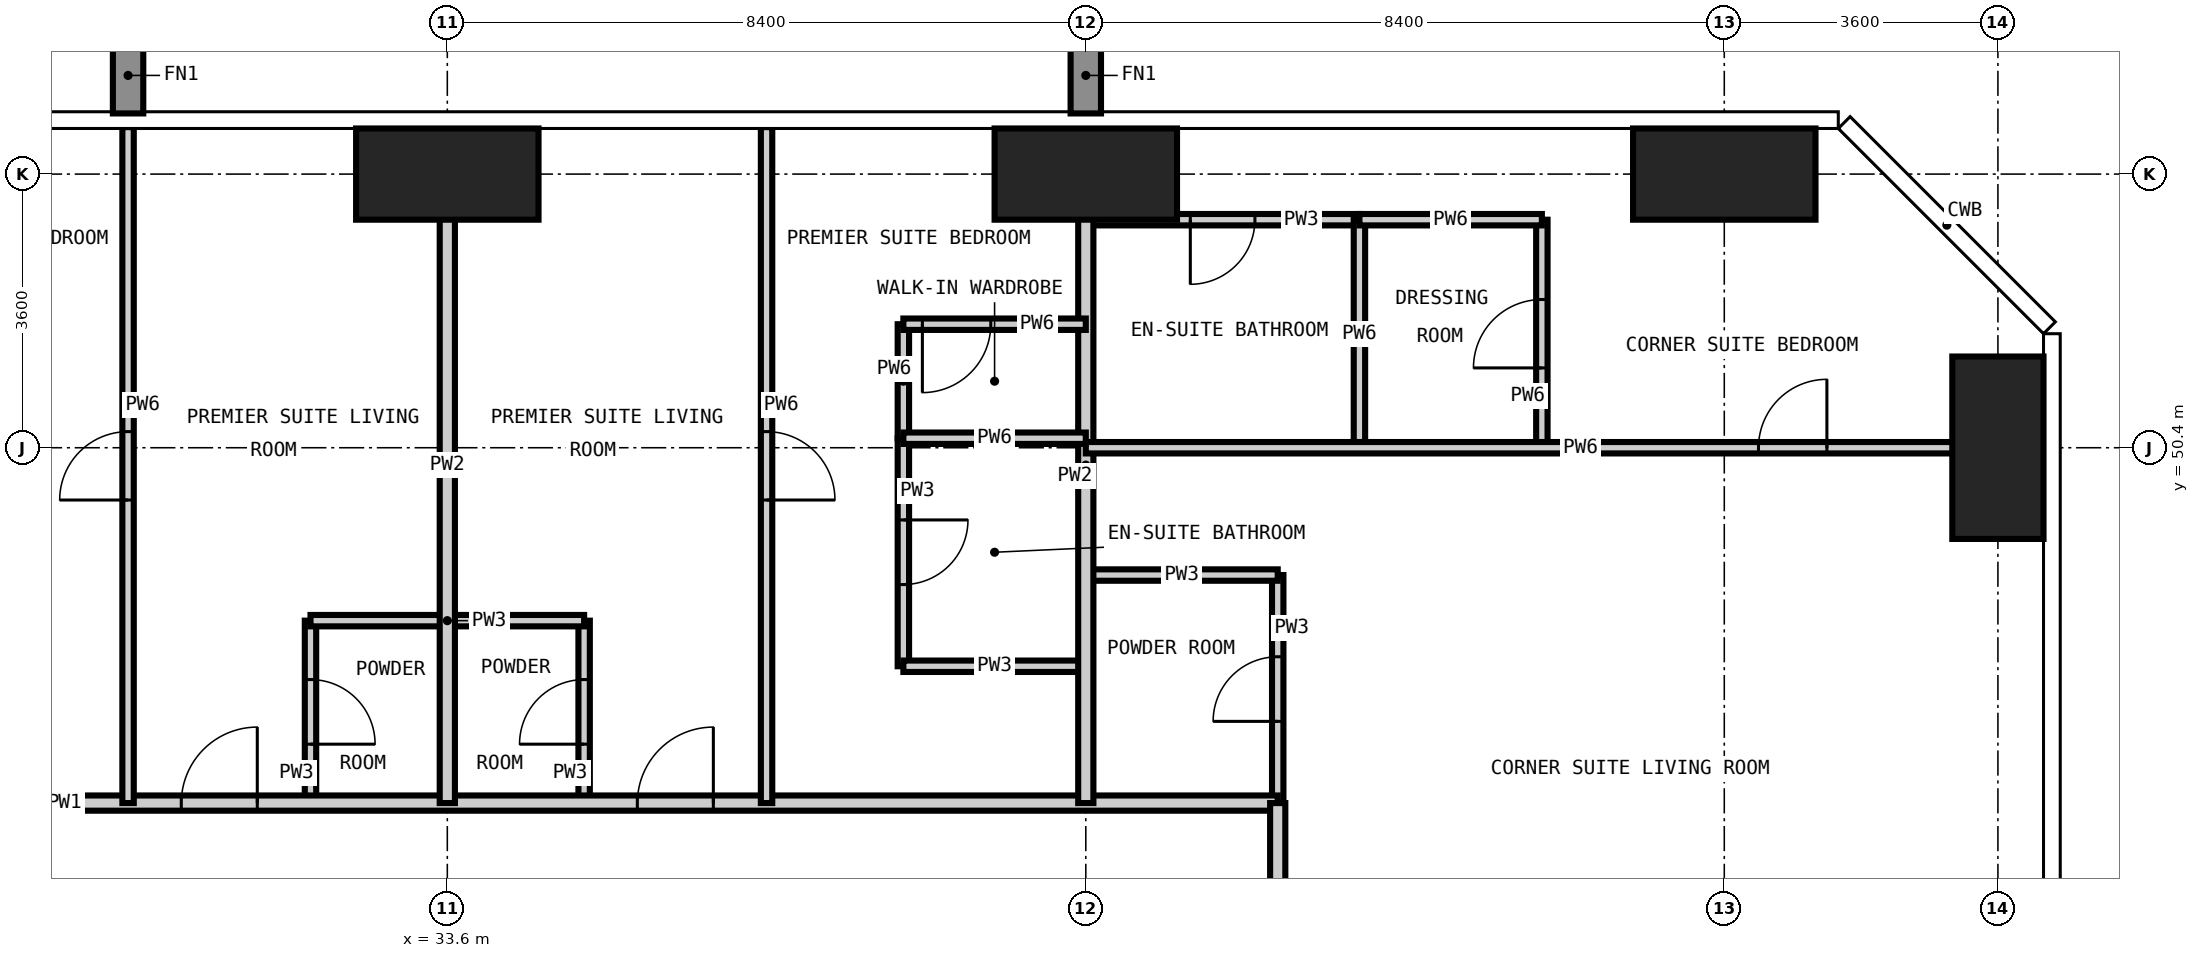
"""IFC4 building model, lengths in metres.
Left out: names, types, materials, properties, quantities, classifications, styles, units other than length and angle.
Written with IfcOpenShell. Run it as: python <this file> out.ifc"""

import sys

from ifc_helpers import new_model, si_unit, direction, frame, frame_2d, origin, origin_2d, place, context, subcontext, project, spatial, rectangle, extrude, element, fill, save


model = new_model("IFC4")
c1 = context("Model", 3, precision=1e-05, world=origin(), true_north=direction((0.0, 1.0)))
c2 = subcontext(c1, "Body", "Model", "MODEL_VIEW")
j1 = project(units=[si_unit("LENGTHUNIT", "METRE"), si_unit("PLANEANGLEUNIT", "RADIAN")], contexts=[c1])
p1 = place(None, origin())
s1 = spatial("IfcSite", under=j1, at=p1, CompositionType="ELEMENT")
p2 = place(p1, origin())
s2 = spatial("IfcBuilding", under=s1, at=p2, CompositionType="ELEMENT")
p3 = place(p2, frame((0.0, 0.0, 122.4)))
s3 = spatial("IfcBuildingStorey", under=s2, at=p3, CompositionType="ELEMENT", Elevation=122.4)
for number, where, z_axis, x_axis in (
    (1, (33.6, 54.0, -0.35), (0.0, 0.0, 1.0), (1.0, 0.0, 0.0)),
    (2, (42.0, 54.0, -0.35), (0.0, 0.0, 1.0), (1.0, 0.0, 0.0)),
    (3, (50.4, 54.0, -0.35), (0.0, 0.0, 1.0), (1.0, 0.0, 0.0)),
):
    element("IfcColumn", number, at=place(p3, frame(where, z_axis=z_axis, x_axis=x_axis)), inside=s3, PredefinedType="COLUMN", context=c2, shape_type="SweptSolid", body=[
        extrude(rectangle(XDim=2.4, YDim=1.2, at=origin_2d()), origin(), (0.0, 0.0, 1.0), 3.6),
    ])
p4 = place(p3, frame((54.0, 50.4, -0.35), z_axis=(0.0, 0.0, 1.0), x_axis=(1.0, 0.0, 0.0)))
e4 = element("IfcColumn", 4, at=p4, inside=s3, PredefinedType="COLUMN", context=c2, shape_type="SweptSolid", body=[
    extrude(rectangle(XDim=1.2, YDim=2.4, at=origin_2d()), origin(), (0.0, 0.0, 1.0), 3.6),
])
p5 = place(p3, frame((31.8, 45.725, 0.0), z_axis=(0.0, 0.0, 1.0), x_axis=(0.0, 1.0, 0.0)))
e5 = element("IfcWall", 5, at=p5, inside=s3, PredefinedType="PARTITIONING", context=c2, shape_type="SweptSolid", body=[
    extrude(rectangle(XDim=2.4, YDim=0.15, at=frame_2d((1.2, 0.0))), origin(), (0.0, 0.0, 1.0), 3.25),
])
p6 = place(p5, frame((0.775, 0.0, 0.0)))
e6 = element("IfcOpeningElement", 6, at=p6, cuts=e5, PredefinedType="OPENING", context=c2, shape_type="SweptSolid", body=[
    extrude(rectangle(XDim=0.85, YDim=2.1, at=frame_2d((0.425, 1.05))), frame((0.0, 0.085, 0.0), z_axis=(0.0, -1.0, 0.0), x_axis=(1.0, 0.0, 0.0)), (0.0, 0.0, 1.0), 0.17),
])
p7 = place(p3, frame((35.4, 45.725, 0.0), z_axis=(0.0, 0.0, 1.0), x_axis=(0.0, 1.0, 0.0)))
e7 = element("IfcWall", 7, at=p7, inside=s3, PredefinedType="PARTITIONING", context=c2, shape_type="SweptSolid", body=[
    extrude(rectangle(XDim=2.4, YDim=0.15, at=frame_2d((1.2, 0.0))), origin(), (0.0, 0.0, 1.0), 3.25),
])
p8 = place(p7, frame((0.775, 0.0, 0.0)))
e8 = element("IfcOpeningElement", 8, at=p8, cuts=e7, PredefinedType="OPENING", context=c2, shape_type="SweptSolid", body=[
    extrude(rectangle(XDim=0.85, YDim=2.1, at=frame_2d((0.425, 1.05))), frame((0.0, 0.085, 0.0), z_axis=(0.0, -1.0, 0.0), x_axis=(1.0, 0.0, 0.0)), (0.0, 0.0, 1.0), 0.17),
])
p9 = place(p3, frame((39.6, 47.525, 0.0), z_axis=(0.0, 0.0, 1.0), x_axis=(0.0, 1.0, 0.0)))
e9 = element("IfcWall", 9, at=p9, inside=s3, PredefinedType="PARTITIONING", context=c2, shape_type="SweptSolid", body=[
    extrude(rectangle(XDim=3.0, YDim=0.15, at=frame_2d((1.5, 0.0))), origin(), (0.0, 0.0, 1.0), 3.25),
])
p10 = place(p9, frame((1.075, 0.0, 0.0)))
e10 = element("IfcOpeningElement", 10, at=p10, cuts=e9, PredefinedType="OPENING", context=c2, shape_type="SweptSolid", body=[
    extrude(rectangle(XDim=0.85, YDim=2.1, at=frame_2d((0.425, 1.05))), frame((0.0, 0.085, 0.0), z_axis=(0.0, -1.0, 0.0), x_axis=(1.0, 0.0, 0.0)), (0.0, 0.0, 1.0), 0.17),
])
p11 = place(p3, frame((44.525, 45.725, 0.0), z_axis=(0.0, 0.0, 1.0), x_axis=(0.0, 1.0, 0.0)))
e11 = element("IfcWall", 11, at=p11, inside=s3, PredefinedType="PARTITIONING", context=c2, shape_type="SweptSolid", body=[
    extrude(rectangle(XDim=3.0, YDim=0.15, at=frame_2d((1.5, 0.0))), origin(), (0.0, 0.0, 1.0), 3.25),
])
p12 = place(p11, frame((1.075, 0.0, 0.0)))
e12 = element("IfcOpeningElement", 12, at=p12, cuts=e11, PredefinedType="OPENING", context=c2, shape_type="SweptSolid", body=[
    extrude(rectangle(XDim=0.85, YDim=2.1, at=frame_2d((0.425, 1.05))), frame((0.0, 0.085, 0.0), z_axis=(0.0, -1.0, 0.0), x_axis=(1.0, 0.0, 0.0)), (0.0, 0.0, 1.0), 0.17),
])
p13 = place(p3, frame((39.6, 47.525, 0.0), z_axis=(0.0, 0.0, 1.0), x_axis=(1.0, 0.0, 0.0)))
e13 = element("IfcWall", 13, at=p13, inside=s3, PredefinedType="PARTITIONING", context=c2, shape_type="SweptSolid", body=[
    extrude(rectangle(XDim=2.4, YDim=0.15, at=frame_2d((1.2, 0.0))), origin(), (0.0, 0.0, 1.0), 3.25),
])
p14 = place(p3, frame((31.8, 48.125, 0.0), z_axis=(0.0, 0.0, 1.0), x_axis=(1.0, 0.0, 0.0)))
e14 = element("IfcWall", 14, at=p14, inside=s3, PredefinedType="PARTITIONING", context=c2, shape_type="SweptSolid", body=[
    extrude(rectangle(XDim=3.6, YDim=0.15, at=frame_2d((1.8, 0.0))), origin(), (0.0, 0.0, 1.0), 3.25),
])
p15 = place(p3, frame((42.0, 48.725, 0.0), z_axis=(0.0, 0.0, 1.0), x_axis=(1.0, 0.0, 0.0)))
e15 = element("IfcWall", 15, at=p15, inside=s3, PredefinedType="PARTITIONING", context=c2, shape_type="SweptSolid", body=[
    extrude(rectangle(XDim=2.525, YDim=0.15, at=frame_2d((1.262, 0.0))), origin(), (0.0, 0.0, 1.0), 3.25),
])
p16 = place(p3, frame((42.0, 53.4, 0.0), z_axis=(0.0, 0.0, 1.0), x_axis=(1.0, 0.0, 0.0)))
e16 = element("IfcWall", 16, at=p16, inside=s3, PredefinedType="PARTITIONING", context=c2, shape_type="SweptSolid", body=[
    extrude(rectangle(XDim=3.6, YDim=0.15, at=frame_2d((1.8, 0.0))), origin(), (0.0, 0.0, 1.0), 3.25),
])
p17 = place(p16, frame((1.375, 0.0, 0.0)))
e17 = element("IfcOpeningElement", 17, at=p17, cuts=e16, PredefinedType="OPENING", context=c2, shape_type="SweptSolid", body=[
    extrude(rectangle(XDim=0.85, YDim=2.1, at=frame_2d((0.425, 1.05))), frame((0.0, 0.085, 0.0), z_axis=(0.0, -1.0, 0.0), x_axis=(1.0, 0.0, 0.0)), (0.0, 0.0, 1.0), 0.17),
])
p18 = place(p3, frame((12.6, 45.725, 0.0), z_axis=(0.0, 0.0, 1.0), x_axis=(1.0, 0.0, 0.0)))
e18 = element("IfcWall", 18, at=p18, inside=s3, PredefinedType="PARTITIONING", context=c2, shape_type="SweptSolid", body=[
    extrude(rectangle(XDim=31.925, YDim=0.2, at=frame_2d((15.962, 0.0))), origin(), (0.0, 0.0, 1.0), 3.25),
])
p19 = place(p18, frame((6.7, 0.0, 0.0)))
e19 = element("IfcOpeningElement", 19, at=p19, cuts=e18, PredefinedType="OPENING", context=c2, shape_type="SweptSolid", body=[
    extrude(rectangle(XDim=1.0, YDim=2.2, at=frame_2d((0.5, 1.1))), frame((0.0, 0.11, 0.0), z_axis=(0.0, -1.0, 0.0), x_axis=(1.0, 0.0, 0.0)), (0.0, 0.0, 1.0), 0.22),
])
p20 = place(p18, frame((17.5, 0.0, 0.0)))
e20 = element("IfcOpeningElement", 20, at=p20, cuts=e18, PredefinedType="OPENING", context=c2, shape_type="SweptSolid", body=[
    extrude(rectangle(XDim=1.0, YDim=2.2, at=frame_2d((0.5, 1.1))), frame((0.0, 0.11, 0.0), z_axis=(0.0, -1.0, 0.0), x_axis=(1.0, 0.0, 0.0)), (0.0, 0.0, 1.0), 0.22),
])
p21 = place(p18, frame((23.5, 0.0, 0.0)))
e21 = element("IfcOpeningElement", 21, at=p21, cuts=e18, PredefinedType="OPENING", context=c2, shape_type="SweptSolid", body=[
    extrude(rectangle(XDim=1.0, YDim=2.2, at=frame_2d((0.5, 1.1))), frame((0.0, 0.11, 0.0), z_axis=(0.0, -1.0, 0.0), x_axis=(1.0, 0.0, 0.0)), (0.0, 0.0, 1.0), 0.22),
])
p22 = place(p3, frame((44.525, 45.725, 0.0), z_axis=(0.0, 0.0, 1.0), x_axis=(0.0, -1.0, 0.0)))
e22 = element("IfcWall", 22, at=p22, inside=s3, PredefinedType="PARTITIONING", context=c2, shape_type="SweptSolid", body=[
    extrude(rectangle(XDim=32.05, YDim=0.2, at=frame_2d((16.025, 0.0))), origin(), (0.0, 0.0, 1.0), 3.25),
])
p23 = place(p22, frame((25.425, 0.0, 0.0)))
e23 = element("IfcOpeningElement", 23, at=p23, cuts=e22, PredefinedType="OPENING", context=c2, shape_type="SweptSolid", body=[
    extrude(rectangle(XDim=1.0, YDim=2.2, at=frame_2d((0.5, 1.1))), frame((0.0, 0.11, 0.0), z_axis=(0.0, -1.0, 0.0), x_axis=(1.0, 0.0, 0.0)), (0.0, 0.0, 1.0), 0.22),
])
p24 = place(p22, frame((14.625, 0.0, 0.0)))
e24 = element("IfcOpeningElement", 24, at=p24, cuts=e22, PredefinedType="OPENING", context=c2, shape_type="SweptSolid", body=[
    extrude(rectangle(XDim=1.0, YDim=2.2, at=frame_2d((0.5, 1.1))), frame((0.0, 0.11, 0.0), z_axis=(0.0, -1.0, 0.0), x_axis=(1.0, 0.0, 0.0)), (0.0, 0.0, 1.0), 0.22),
])
p25 = place(p22, frame((8.625, 0.0, 0.0)))
e25 = element("IfcOpeningElement", 25, at=p25, cuts=e22, PredefinedType="OPENING", context=c2, shape_type="SweptSolid", body=[
    extrude(rectangle(XDim=1.0, YDim=2.2, at=frame_2d((0.5, 1.1))), frame((0.0, 0.11, 0.0), z_axis=(0.0, -1.0, 0.0), x_axis=(1.0, 0.0, 0.0)), (0.0, 0.0, 1.0), 0.22),
])
p26 = place(p22, frame((29.987, 0.0, 0.0)))
e26 = element("IfcOpeningElement", 26, at=p26, cuts=e22, PredefinedType="OPENING", context=c2, shape_type="SweptSolid", body=[
    extrude(rectangle(XDim=1.0, YDim=2.2, at=frame_2d((0.5, 1.1))), frame((0.0, 0.11, 0.0), z_axis=(0.0, -1.0, 0.0), x_axis=(1.0, 0.0, 0.0)), (0.0, 0.0, 1.0), 0.22),
])
p27 = place(p22, frame((1.363, 0.0, 0.0)))
e27 = element("IfcOpeningElement", 27, at=p27, cuts=e22, PredefinedType="OPENING", context=c2, shape_type="SweptSolid", body=[
    extrude(rectangle(XDim=1.0, YDim=2.2, at=frame_2d((0.5, 1.1))), frame((0.0, 0.11, 0.0), z_axis=(0.0, -1.0, 0.0), x_axis=(1.0, 0.0, 0.0)), (0.0, 0.0, 1.0), 0.22),
])
for number, where, z_axis, x_axis in (
    (28, (33.6, 45.725, 0.0), (0.0, 0.0, 1.0), (0.0, 1.0, 0.0)),
    (29, (42.0, 45.725, 0.0), (0.0, 0.0, 1.0), (0.0, 1.0, 0.0)),
):
    element("IfcWall", number, at=place(p3, frame(where, z_axis=z_axis, x_axis=x_axis)), inside=s3, PredefinedType="PARTITIONING", context=c2, shape_type="SweptSolid", body=[
        extrude(rectangle(XDim=8.893, YDim=0.2, at=frame_2d((4.446, 0.0))), origin(), (0.0, 0.0, 1.0), 3.25),
    ])
p28 = place(p3, frame((29.4, 45.725, 0.0), z_axis=(0.0, 0.0, 1.0), x_axis=(0.0, 1.0, 0.0)))
e30 = element("IfcWall", 30, at=p28, inside=s3, PredefinedType="PARTITIONING", context=c2, shape_type="SweptSolid", body=[
    extrude(rectangle(XDim=8.893, YDim=0.15, at=frame_2d((4.446, 0.0))), origin(), (0.0, 0.0, 1.0), 3.25),
])
p29 = place(p28, frame((3.987, 0.0, 0.0)))
e31 = element("IfcOpeningElement", 31, at=p29, cuts=e30, PredefinedType="OPENING", context=c2, shape_type="SweptSolid", body=[
    extrude(rectangle(XDim=0.9, YDim=2.1, at=frame_2d((0.45, 1.05))), frame((0.0, 0.085, 0.0), z_axis=(0.0, -1.0, 0.0), x_axis=(1.0, 0.0, 0.0)), (0.0, 0.0, 1.0), 0.17),
])
p30 = place(p3, frame((37.8, 45.725, 0.0), z_axis=(0.0, 0.0, 1.0), x_axis=(0.0, 1.0, 0.0)))
e32 = element("IfcWall", 32, at=p30, inside=s3, PredefinedType="PARTITIONING", context=c2, shape_type="SweptSolid", body=[
    extrude(rectangle(XDim=8.893, YDim=0.15, at=frame_2d((4.446, 0.0))), origin(), (0.0, 0.0, 1.0), 3.25),
])
p31 = place(p30, frame((3.987, 0.0, 0.0)))
e33 = element("IfcOpeningElement", 33, at=p31, cuts=e32, PredefinedType="OPENING", context=c2, shape_type="SweptSolid", body=[
    extrude(rectangle(XDim=0.9, YDim=2.1, at=frame_2d((0.45, 1.05))), frame((0.0, 0.085, 0.0), z_axis=(0.0, -1.0, 0.0), x_axis=(1.0, 0.0, 0.0)), (0.0, 0.0, 1.0), 0.17),
])
p32 = place(p3, frame((39.6, 50.525, 0.0), z_axis=(0.0, 0.0, 1.0), x_axis=(0.0, 1.0, 0.0)))
e34 = element("IfcWall", 34, at=p32, inside=s3, PredefinedType="PARTITIONING", context=c2, shape_type="SweptSolid", body=[
    extrude(rectangle(XDim=1.5, YDim=0.15, at=frame_2d((0.75, 0.0))), origin(), (0.0, 0.0, 1.0), 3.25),
])
p33 = place(p3, frame((45.6, 50.4, 0.0), z_axis=(0.0, 0.0, 1.0), x_axis=(0.0, 1.0, 0.0)))
e35 = element("IfcWall", 35, at=p33, inside=s3, PredefinedType="PARTITIONING", context=c2, shape_type="SweptSolid", body=[
    extrude(rectangle(XDim=3.0, YDim=0.15, at=frame_2d((1.5, 0.0))), origin(), (0.0, 0.0, 1.0), 3.25),
])
p34 = place(p3, frame((48.0, 50.4, 0.0), z_axis=(0.0, 0.0, 1.0), x_axis=(0.0, 1.0, 0.0)))
e36 = element("IfcWall", 36, at=p34, inside=s3, PredefinedType="PARTITIONING", context=c2, shape_type="SweptSolid", body=[
    extrude(rectangle(XDim=3.0, YDim=0.15, at=frame_2d((1.5, 0.0))), origin(), (0.0, 0.0, 1.0), 3.25),
])
p35 = place(p34, frame((1.05, 0.0, 0.0)))
e37 = element("IfcOpeningElement", 37, at=p35, cuts=e36, PredefinedType="OPENING", context=c2, shape_type="SweptSolid", body=[
    extrude(rectangle(XDim=0.9, YDim=2.1, at=frame_2d((0.45, 1.05))), frame((0.0, 0.085, 0.0), z_axis=(0.0, -1.0, 0.0), x_axis=(1.0, 0.0, 0.0)), (0.0, 0.0, 1.0), 0.17),
])
p36 = place(p3, frame((42.0, 50.4, 0.0), z_axis=(0.0, 0.0, 1.0), x_axis=(1.0, 0.0, 0.0)))
e38 = element("IfcWall", 38, at=p36, inside=s3, PredefinedType="PARTITIONING", context=c2, shape_type="SweptSolid", body=[
    extrude(rectangle(XDim=12.618, YDim=0.15, at=frame_2d((6.309, 0.0))), origin(), (0.0, 0.0, 1.0), 3.25),
])
p37 = place(p36, frame((8.85, 0.0, 0.0)))
e39 = element("IfcOpeningElement", 39, at=p37, cuts=e38, PredefinedType="OPENING", context=c2, shape_type="SweptSolid", body=[
    extrude(rectangle(XDim=0.9, YDim=2.1, at=frame_2d((0.45, 1.05))), frame((0.0, 0.085, 0.0), z_axis=(0.0, -1.0, 0.0), x_axis=(1.0, 0.0, 0.0)), (0.0, 0.0, 1.0), 0.17),
])
p38 = place(p3, frame((39.6, 50.525, 0.0), z_axis=(0.0, 0.0, 1.0), x_axis=(1.0, 0.0, 0.0)))
e40 = element("IfcWall", 40, at=p38, inside=s3, PredefinedType="PARTITIONING", context=c2, shape_type="SweptSolid", body=[
    extrude(rectangle(XDim=2.4, YDim=0.15, at=frame_2d((1.2, 0.0))), origin(), (0.0, 0.0, 1.0), 3.25),
])
p39 = place(p3, frame((39.6, 52.025, 0.0), z_axis=(0.0, 0.0, 1.0), x_axis=(1.0, 0.0, 0.0)))
e41 = element("IfcWall", 41, at=p39, inside=s3, PredefinedType="PARTITIONING", context=c2, shape_type="SweptSolid", body=[
    extrude(rectangle(XDim=2.4, YDim=0.15, at=frame_2d((1.2, 0.0))), origin(), (0.0, 0.0, 1.0), 3.25),
])
p40 = place(p39, frame((0.25, 0.0, 0.0)))
e42 = element("IfcOpeningElement", 42, at=p40, cuts=e41, PredefinedType="OPENING", context=c2, shape_type="SweptSolid", body=[
    extrude(rectangle(XDim=0.9, YDim=2.1, at=frame_2d((0.45, 1.05))), frame((0.0, 0.085, 0.0), z_axis=(0.0, -1.0, 0.0), x_axis=(1.0, 0.0, 0.0)), (0.0, 0.0, 1.0), 0.17),
])
p41 = place(p3, frame((45.6, 53.4, 0.0), z_axis=(0.0, 0.0, 1.0), x_axis=(1.0, 0.0, 0.0)))
e43 = element("IfcWall", 43, at=p41, inside=s3, PredefinedType="PARTITIONING", context=c2, shape_type="SweptSolid", body=[
    extrude(rectangle(XDim=2.4, YDim=0.15, at=frame_2d((1.2, 0.0))), origin(), (0.0, 0.0, 1.0), 3.25),
])
p42 = place(p20, origin())
e44 = element("IfcDoor", 44, at=p42, inside=s3, OperationType="SINGLE_SWING_RIGHT", PredefinedType="DOOR", context=c2, shape_type="SweptSolid", body=[
    extrude(rectangle(XDim=1.0, YDim=2.2, at=frame_2d((0.5, 1.1))), frame((0.0, 0.025, 0.0), z_axis=(0.0, -1.0, 0.0), x_axis=(1.0, 0.0, 0.0)), (0.0, 0.0, 1.0), 0.05),
])
fill(e20, e44)
p43 = place(p6, frame((0.85, 0.0, 0.0), z_axis=(0.0, 0.0, 1.0), x_axis=(-1.0, 0.0, 0.0)))
e45 = element("IfcDoor", 45, at=p43, inside=s3, OperationType="SINGLE_SWING_RIGHT", PredefinedType="DOOR", context=c2, shape_type="SweptSolid", body=[
    extrude(rectangle(XDim=0.85, YDim=2.1, at=frame_2d((0.425, 1.05))), frame((0.0, 0.025, 0.0), z_axis=(0.0, -1.0, 0.0), x_axis=(1.0, 0.0, 0.0)), (0.0, 0.0, 1.0), 0.05),
])
fill(e6, e45)
p44 = place(p29, origin())
e46 = element("IfcDoor", 46, at=p44, inside=s3, OperationType="SINGLE_SWING_LEFT", PredefinedType="DOOR", context=c2, shape_type="SweptSolid", body=[
    extrude(rectangle(XDim=0.9, YDim=2.1, at=frame_2d((0.45, 1.05))), frame((0.0, 0.025, 0.0), z_axis=(0.0, -1.0, 0.0), x_axis=(1.0, 0.0, 0.0)), (0.0, 0.0, 1.0), 0.05),
])
fill(e31, e46)
p45 = place(p21, origin())
e47 = element("IfcDoor", 47, at=p45, inside=s3, OperationType="SINGLE_SWING_RIGHT", PredefinedType="DOOR", context=c2, shape_type="SweptSolid", body=[
    extrude(rectangle(XDim=1.0, YDim=2.2, at=frame_2d((0.5, 1.1))), frame((0.0, 0.025, 0.0), z_axis=(0.0, -1.0, 0.0), x_axis=(1.0, 0.0, 0.0)), (0.0, 0.0, 1.0), 0.05),
])
fill(e21, e47)
p46 = place(p8, origin())
e48 = element("IfcDoor", 48, at=p46, inside=s3, OperationType="SINGLE_SWING_LEFT", PredefinedType="DOOR", context=c2, shape_type="SweptSolid", body=[
    extrude(rectangle(XDim=0.85, YDim=2.1, at=frame_2d((0.425, 1.05))), frame((0.0, 0.025, 0.0), z_axis=(0.0, -1.0, 0.0), x_axis=(1.0, 0.0, 0.0)), (0.0, 0.0, 1.0), 0.05),
])
fill(e8, e48)
p47 = place(p31, frame((0.9, 0.0, 0.0), z_axis=(0.0, 0.0, 1.0), x_axis=(-1.0, 0.0, 0.0)))
e49 = element("IfcDoor", 49, at=p47, inside=s3, OperationType="SINGLE_SWING_RIGHT", PredefinedType="DOOR", context=c2, shape_type="SweptSolid", body=[
    extrude(rectangle(XDim=0.9, YDim=2.1, at=frame_2d((0.45, 1.05))), frame((0.0, 0.025, 0.0), z_axis=(0.0, -1.0, 0.0), x_axis=(1.0, 0.0, 0.0)), (0.0, 0.0, 1.0), 0.05),
])
fill(e33, e49)
p48 = place(p10, frame((0.85, 0.0, 0.0), z_axis=(0.0, 0.0, 1.0), x_axis=(-1.0, 0.0, 0.0)))
e50 = element("IfcDoor", 50, at=p48, inside=s3, OperationType="SINGLE_SWING_LEFT", PredefinedType="DOOR", context=c2, shape_type="SweptSolid", body=[
    extrude(rectangle(XDim=0.85, YDim=2.1, at=frame_2d((0.425, 1.05))), frame((0.0, 0.025, 0.0), z_axis=(0.0, -1.0, 0.0), x_axis=(1.0, 0.0, 0.0)), (0.0, 0.0, 1.0), 0.05),
])
fill(e10, e50)
p49 = place(p40, frame((0.9, 0.0, 0.0), z_axis=(0.0, 0.0, 1.0), x_axis=(-1.0, 0.0, 0.0)))
e51 = element("IfcDoor", 51, at=p49, inside=s3, OperationType="SINGLE_SWING_RIGHT", PredefinedType="DOOR", context=c2, shape_type="SweptSolid", body=[
    extrude(rectangle(XDim=0.9, YDim=2.1, at=frame_2d((0.45, 1.05))), frame((0.0, 0.025, 0.0), z_axis=(0.0, -1.0, 0.0), x_axis=(1.0, 0.0, 0.0)), (0.0, 0.0, 1.0), 0.05),
])
fill(e42, e51)
p50 = place(p12, origin())
e52 = element("IfcDoor", 52, at=p50, inside=s3, OperationType="SINGLE_SWING_LEFT", PredefinedType="DOOR", context=c2, shape_type="SweptSolid", body=[
    extrude(rectangle(XDim=0.85, YDim=2.1, at=frame_2d((0.425, 1.05))), frame((0.0, 0.025, 0.0), z_axis=(0.0, -1.0, 0.0), x_axis=(1.0, 0.0, 0.0)), (0.0, 0.0, 1.0), 0.05),
])
fill(e12, e52)
p51 = place(p37, origin())
e53 = element("IfcDoor", 53, at=p51, inside=s3, OperationType="SINGLE_SWING_RIGHT", PredefinedType="DOOR", context=c2, shape_type="SweptSolid", body=[
    extrude(rectangle(XDim=0.9, YDim=2.1, at=frame_2d((0.45, 1.05))), frame((0.0, 0.025, 0.0), z_axis=(0.0, -1.0, 0.0), x_axis=(1.0, 0.0, 0.0)), (0.0, 0.0, 1.0), 0.05),
])
fill(e39, e53)
p52 = place(p17, frame((0.85, 0.0, 0.0), z_axis=(0.0, 0.0, 1.0), x_axis=(-1.0, 0.0, 0.0)))
e54 = element("IfcDoor", 54, at=p52, inside=s3, OperationType="SINGLE_SWING_RIGHT", PredefinedType="DOOR", context=c2, shape_type="SweptSolid", body=[
    extrude(rectangle(XDim=0.85, YDim=2.1, at=frame_2d((0.425, 1.05))), frame((0.0, 0.025, 0.0), z_axis=(0.0, -1.0, 0.0), x_axis=(1.0, 0.0, 0.0)), (0.0, 0.0, 1.0), 0.05),
])
fill(e17, e54)
p53 = place(p35, origin())
e55 = element("IfcDoor", 55, at=p53, inside=s3, OperationType="SINGLE_SWING_LEFT", PredefinedType="DOOR", context=c2, shape_type="SweptSolid", body=[
    extrude(rectangle(XDim=0.9, YDim=2.1, at=frame_2d((0.45, 1.05))), frame((0.0, 0.025, 0.0), z_axis=(0.0, -1.0, 0.0), x_axis=(1.0, 0.0, 0.0)), (0.0, 0.0, 1.0), 0.05),
])
fill(e37, e55)
save(model, sys.argv[1])
